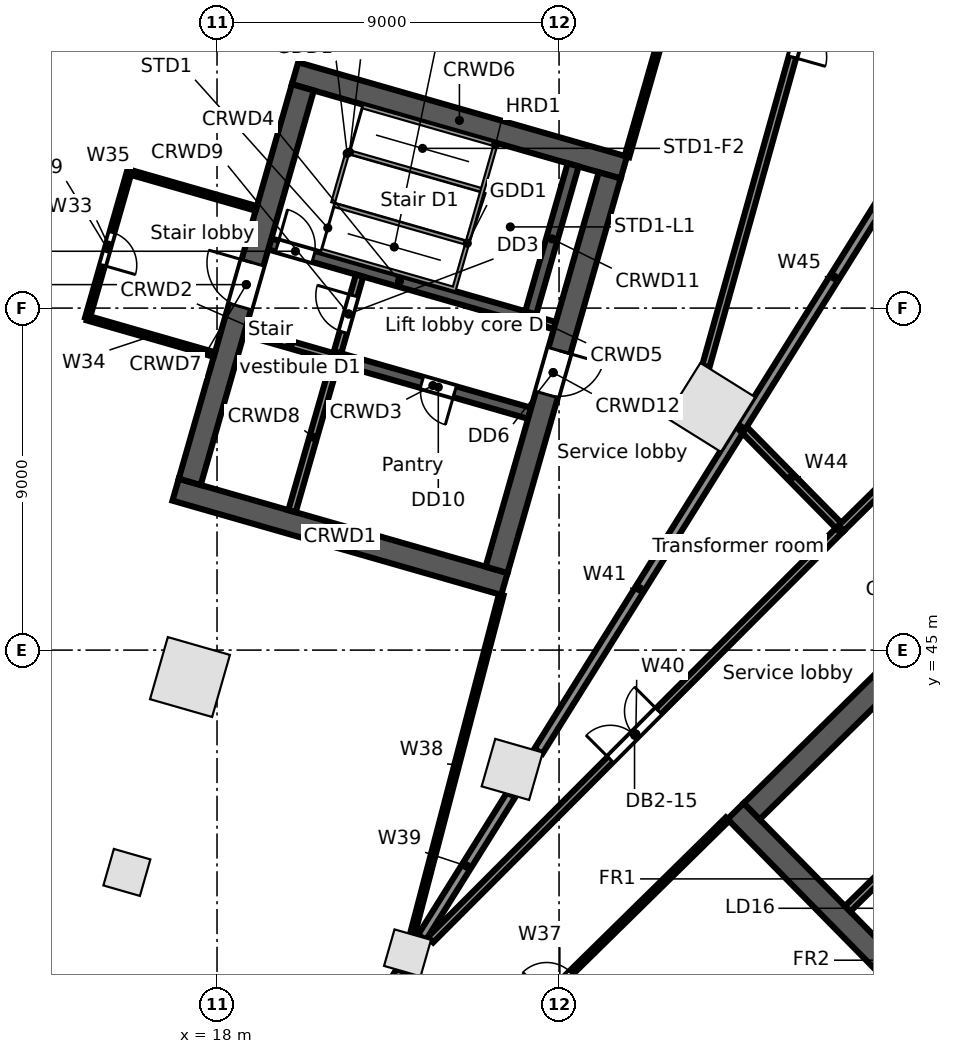
"""IFC4 building model, lengths in metres.
Left out: names, types, materials, properties, quantities, classifications, styles, units other than length and angle.
Written with IfcOpenShell. Run it as: python <this file> out.ifc"""

import sys

from ifc_helpers import new_model, si_unit, direction, frame, frame_2d, origin, origin_2d, place, context, subcontext, project, spatial, rectangle, extrude, element, fill, save


model = new_model("IFC4")
c1 = context("Model", 3, precision=1e-05, world=origin(), true_north=direction((0.0, 1.0)))
c2 = subcontext(c1, "Body", "Model", "MODEL_VIEW")
j1 = project(units=[si_unit("LENGTHUNIT", "METRE"), si_unit("PLANEANGLEUNIT", "RADIAN")], contexts=[c1])
p1 = place(None, origin())
s1 = spatial("IfcSite", under=j1, at=p1, CompositionType="ELEMENT")
p2 = place(p1, origin())
s2 = spatial("IfcBuilding", under=s1, at=p2, CompositionType="ELEMENT")
p3 = place(p2, frame((0.0, 0.0, -9.6)))
s3 = spatial("IfcBuildingStorey", under=s2, at=p3, CompositionType="ELEMENT", Elevation=-9.6)
p4 = place(p3, frame((1.961, 38.491, -0.5), z_axis=(0.0, 0.0, 1.0), x_axis=(0.961261264877, -0.275638859104, 0.0)))
e1 = element("IfcWall", 1, at=p4, inside=s3, PredefinedType="SOLIDWALL", context=c2, shape_type="SweptSolid", body=[
    extrude(rectangle(XDim=20.341, YDim=0.8, at=frame_2d((10.17, 0.0))), origin(), (0.0, 0.0, 1.0), 5.3),
])
p5 = place(p3, frame((17.288, 44.291, -0.5), z_axis=(0.0, 0.0, 1.0), x_axis=(0.961261695938, -0.275637355817, 0.0)))
e2 = element("IfcColumn", 2, at=p5, inside=s3, PredefinedType="COLUMN", context=c2, shape_type="SweptSolid", body=[
    extrude(rectangle(XDim=1.7, YDim=1.7, at=origin_2d()), origin(), (0.0, 0.0, 1.0), 5.3),
])
p6 = place(p3, frame((25.767, 41.86, -0.5), z_axis=(0.0, 0.0, 1.0), x_axis=(0.961261695938, -0.275637355817, 0.0)))
e3 = element("IfcColumn", 3, at=p6, inside=s3, PredefinedType="COLUMN", context=c2, shape_type="SweptSolid", body=[
    extrude(rectangle(XDim=1.3, YDim=1.3, at=origin_2d()), origin(), (0.0, 0.0, 1.0), 5.3),
])
p7 = place(p3, frame((30.99, 51.386, -0.5), z_axis=(0.0, 0.0, 1.0), x_axis=(0.529919264233, 0.848048096156, 0.0)))
e4 = element("IfcColumn", 4, at=p7, inside=s3, PredefinedType="COLUMN", context=c2, shape_type="SweptSolid", body=[
    extrude(rectangle(XDim=1.7, YDim=1.7, at=origin_2d()), origin(), (0.0, 0.0, 1.0), 5.3),
])
for number, where, z_axis, x_axis in (
    (5, (15.628, 39.149, -0.5), (0.0, 0.0, 1.0), (0.961, -0.276, 0.0)),
    (6, (23.013, 37.032, -0.5), (0.0, 0.0, 1.0), (0.961, -0.276, 0.0)),
):
    element("IfcColumn", number, at=place(p3, frame(where, z_axis=z_axis, x_axis=x_axis)), inside=s3, PredefinedType="COLUMN", context=c2, shape_type="SweptSolid", body=[
        extrude(rectangle(XDim=1.0, YDim=1.0, at=origin_2d()), origin(), (0.0, 0.0, 1.0), 5.3),
    ])
p8 = place(p3, frame((31.646, 40.763, 0.0), z_axis=(0.0, 0.0, 1.0), x_axis=(0.700911255944, -0.713248491965, 0.0)))
e7 = element("IfcWall", 7, at=p8, inside=s3, PredefinedType="SOLIDWALL", context=c2, shape_type="SweptSolid", body=[
    extrude(rectangle(XDim=15.0, YDim=0.6, at=frame_2d((7.5, 0.0))), origin(), (0.0, 0.0, 1.0), 4.4),
])
p9 = place(p8, frame((12.9, 0.0, 0.0)))
e8 = element("IfcOpeningElement", 8, at=p9, cuts=e7, PredefinedType="OPENING", context=c2, shape_type="SweptSolid", body=[
    extrude(rectangle(XDim=1.2, YDim=2.1, at=frame_2d((0.6, 1.05))), frame((0.0, 0.31, 0.0), z_axis=(0.0, -1.0, 0.0), x_axis=(1.0, 0.0, 0.0)), (0.0, 0.0, 1.0), 0.62),
])
p10 = place(p3, frame((32.07, 40.759, 0.0), z_axis=(0.0, 0.0, 1.0), x_axis=(0.713245344712, 0.70091445858, 0.0)))
e9 = element("IfcWall", 9, at=p10, inside=s3, PredefinedType="SOLIDWALL", context=c2, shape_type="SweptSolid", body=[
    extrude(rectangle(XDim=13.8, YDim=0.6, at=frame_2d((6.9, 0.0))), origin(), (0.0, 0.0, 1.0), 4.4),
])
p11 = place(p3, frame((34.593, 38.191, 0.0), z_axis=(0.0, 0.0, 1.0), x_axis=(0.713252216116, 0.700907466222, 0.0)))
e10 = element("IfcWall", 10, at=p11, inside=s3, PredefinedType="SOLIDWALL", context=c2, shape_type="SweptSolid", body=[
    extrude(rectangle(XDim=4.45, YDim=0.2, at=frame_2d((2.225, 0.0))), origin(), (0.0, 0.0, 1.0), 4.4),
])
p12 = place(p3, frame((16.911, 49.221, 0.0), z_axis=(0.0, 0.0, 1.0), x_axis=(0.96126248289, -0.275634611374, 0.0)))
e11 = element("IfcWall", 11, at=p12, inside=s3, PredefinedType="SOLIDWALL", context=c2, shape_type="SweptSolid", body=[
    extrude(rectangle(XDim=9.0, YDim=0.6, at=frame_2d((4.5, 0.0))), origin(), (0.0, 0.0, 1.0), 4.4),
])
p13 = place(p3, frame((18.728, 53.382, 0.0), z_axis=(0.0, 0.0, 1.0), x_axis=(0.961247070632, -0.275688355216, 0.0)))
e12 = element("IfcWall", 12, at=p13, inside=s3, PredefinedType="SOLIDWALL", context=c2, shape_type="SweptSolid", body=[
    extrude(rectangle(XDim=2.5, YDim=0.2, at=frame_2d((1.25, 0.0))), origin(), (0.0, 0.0, 1.0), 4.4),
])
p14 = place(p3, frame((21.131, 52.692, 0.0), z_axis=(0.0, 0.0, 1.0), x_axis=(0.961271492568, -0.275603188616, 0.0)))
e13 = element("IfcWall", 13, at=p14, inside=s3, PredefinedType="SOLIDWALL", context=c2, shape_type="SweptSolid", body=[
    extrude(rectangle(XDim=5.3, YDim=0.3, at=frame_2d((2.65, 0.0))), origin(), (0.0, 0.0, 1.0), 4.4),
])
p15 = place(p14, frame((2.35, 0.0, 0.0)))
e14 = element("IfcOpeningElement", 14, at=p15, cuts=e13, PredefinedType="OPENING", context=c2, shape_type="SweptSolid", body=[
    extrude(rectangle(XDim=0.9, YDim=2.1, at=frame_2d((0.45, 1.05))), frame((0.0, 0.16, 0.0), z_axis=(0.0, -1.0, 0.0), x_axis=(1.0, 0.0, 0.0)), (0.0, 0.0, 1.0), 0.32),
])
p16 = place(p3, frame((19.389, 55.689, 0.0), z_axis=(0.0, 0.0, 1.0), x_axis=(0.961261397636, -0.275638396117, 0.0)))
e15 = element("IfcWall", 15, at=p16, inside=s3, PredefinedType="SOLIDWALL", context=c2, shape_type="SweptSolid", body=[
    extrude(rectangle(XDim=7.1, YDim=0.3, at=frame_2d((3.55, 0.0))), origin(), (0.0, 0.0, 1.0), 4.4),
])
p17 = place(p16, frame((0.2, 0.0, 0.0)))
e16 = element("IfcOpeningElement", 16, at=p17, cuts=e15, PredefinedType="OPENING", context=c2, shape_type="SweptSolid", body=[
    extrude(rectangle(XDim=1.0, YDim=2.1, at=frame_2d((0.5, 1.05))), frame((0.0, 0.16, 0.0), z_axis=(0.0, -1.0, 0.0), x_axis=(1.0, 0.0, 0.0)), (0.0, 0.0, 1.0), 0.32),
])
p18 = place(p3, frame((26.214, 53.732, 0.0), z_axis=(0.0, 0.0, 1.0), x_axis=(0.96122076476, -0.27578005982, 0.0)))
e17 = element("IfcWall", 17, at=p18, inside=s3, PredefinedType="SOLIDWALL", context=c2, shape_type="SweptSolid", body=[
    extrude(rectangle(XDim=0.7, YDim=0.2, at=frame_2d((0.35, 0.0))), origin(), (0.0, 0.0, 1.0), 4.4),
])
p19 = place(p3, frame((20.053, 60.18, 0.0), z_axis=(0.0, 0.0, 1.0), x_axis=(0.96126248289, -0.275634611374, 0.0)))
e18 = element("IfcWall", 18, at=p19, inside=s3, PredefinedType="SOLIDWALL", context=c2, shape_type="SweptSolid", body=[
    extrude(rectangle(XDim=9.0, YDim=0.6, at=frame_2d((4.5, 0.0))), origin(), (0.0, 0.0, 1.0), 4.4),
])
p20 = place(p3, frame((17.282, 49.427, 0.0), z_axis=(0.0, 0.0, 1.0), x_axis=(0.275631631629, 0.961263337304, 0.0)))
e19 = element("IfcWall", 19, at=p20, inside=s3, PredefinedType="SOLIDWALL", context=c2, shape_type="SweptSolid", body=[
    extrude(rectangle(XDim=10.8, YDim=0.6, at=frame_2d((5.4, 0.0))), origin(), (0.0, 0.0, 1.0), 4.4),
])
p21 = place(p20, frame((4.8, 0.0, 0.0)))
e20 = element("IfcOpeningElement", 20, at=p21, cuts=e19, PredefinedType="OPENING", context=c2, shape_type="SweptSolid", body=[
    extrude(rectangle(XDim=1.2, YDim=2.1, at=frame_2d((0.6, 1.05))), frame((0.0, 0.31, 0.0), z_axis=(0.0, -1.0, 0.0), x_axis=(1.0, 0.0, 0.0)), (0.0, 0.0, 1.0), 0.62),
])
p22 = place(p3, frame((19.973, 48.655, 0.0), z_axis=(0.0, 0.0, 1.0), x_axis=(0.275668441653, 0.961252781674, 0.0)))
e21 = element("IfcWall", 21, at=p22, inside=s3, PredefinedType="SOLIDWALL", context=c2, shape_type="SweptSolid", body=[
    extrude(rectangle(XDim=4.05, YDim=0.2, at=frame_2d((2.025, 0.0))), origin(), (0.0, 0.0, 1.0), 4.4),
])
p23 = place(p3, frame((21.172, 52.837, 0.0), z_axis=(0.0, 0.0, 1.0), x_axis=(0.275657676022, 0.961255868981, 0.0)))
e22 = element("IfcWall", 22, at=p23, inside=s3, PredefinedType="PARTITIONING", context=c2, shape_type="SweptSolid", body=[
    extrude(rectangle(XDim=2.1, YDim=0.2, at=frame_2d((1.05, 0.0))), origin(), (0.0, 0.0, 1.0), 4.4),
])
p24 = place(p23, frame((0.55, 0.0, 0.0)))
e23 = element("IfcOpeningElement", 23, at=p24, cuts=e22, PredefinedType="OPENING", context=c2, shape_type="SweptSolid", body=[
    extrude(rectangle(XDim=1.0, YDim=2.1, at=frame_2d((0.5, 1.05))), frame((0.0, 0.11, 0.0), z_axis=(0.0, -1.0, 0.0), x_axis=(1.0, 0.0, 0.0)), (0.0, 0.0, 1.0), 0.22),
])
p25 = place(p3, frame((26.256, 53.876, 0.0), z_axis=(0.0, 0.0, 1.0), x_axis=(0.275612739511, 0.961268754209, 0.0)))
e24 = element("IfcWall", 24, at=p25, inside=s3, PredefinedType="SOLIDWALL", context=c2, shape_type="SweptSolid", body=[
    extrude(rectangle(XDim=4.05, YDim=0.3, at=frame_2d((2.025, 0.0))), origin(), (0.0, 0.0, 1.0), 4.4),
])
p26 = place(p3, frame((25.356, 47.112, 0.0), z_axis=(0.0, 0.0, 1.0), x_axis=(0.275631631629, 0.961263337304, 0.0)))
e25 = element("IfcWall", 25, at=p26, inside=s3, PredefinedType="SOLIDWALL", context=c2, shape_type="SweptSolid", body=[
    extrude(rectangle(XDim=10.8, YDim=0.6, at=frame_2d((5.4, 0.0))), origin(), (0.0, 0.0, 1.0), 4.4),
])
p27 = place(p26, frame((4.8, 0.0, 0.0)))
e26 = element("IfcOpeningElement", 26, at=p27, cuts=e25, PredefinedType="OPENING", context=c2, shape_type="SweptSolid", body=[
    extrude(rectangle(XDim=1.2, YDim=2.1, at=frame_2d((0.6, 1.05))), frame((0.0, 0.31, 0.0), z_axis=(0.0, -1.0, 0.0), x_axis=(1.0, 0.0, 0.0)), (0.0, 0.0, 1.0), 0.62),
])
p28 = place(p3, frame((14.589, 53.736, 0.0), z_axis=(0.0, 0.0, 1.0), x_axis=(0.275470792429, 0.961309441605, 0.0)))
e27 = element("IfcWall", 27, at=p28, inside=s3, PredefinedType="PARTITIONING", context=c2, shape_type="SweptSolid", body=[
    extrude(rectangle(XDim=4.0, YDim=0.125, at=frame_2d((2.0, 0.0))), origin(), (0.0, 0.0, 1.0), 3.462),
])
p29 = place(p28, frame((1.45, 0.0, 0.0)))
e28 = element("IfcOpeningElement", 28, at=p29, cuts=e27, PredefinedType="OPENING", context=c2, shape_type="SweptSolid", body=[
    extrude(rectangle(XDim=0.9, YDim=2.1, at=frame_2d((0.45, 1.05))), frame((0.0, 0.073, 0.0), z_axis=(0.0, -1.0, 0.0), x_axis=(1.0, 0.0, 0.0)), (0.0, 0.0, 1.0), 0.145),
])
p30 = place(p3, frame((14.589, 53.736, 0.0), z_axis=(0.0, 0.0, 1.0), x_axis=(0.961258417425, -0.275648789095, 0.0)))
e29 = element("IfcWall", 29, at=p30, inside=s3, PredefinedType="PARTITIONING", context=c2, shape_type="SweptSolid", body=[
    extrude(rectangle(XDim=3.476, YDim=0.125, at=frame_2d((1.738, 0.0))), origin(), (0.0, 0.0, 1.0), 4.4),
])
p31 = place(p3, frame((15.691, 57.581, 0.0), z_axis=(0.0, 0.0, 1.0), x_axis=(0.9612850915, -0.275555752725, 0.0)))
e30 = element("IfcWall", 30, at=p31, inside=s3, PredefinedType="PARTITIONING", context=c2, shape_type="SweptSolid", body=[
    extrude(rectangle(XDim=3.477, YDim=0.125, at=frame_2d((1.738, 0.0))), origin(), (0.0, 0.0, 1.0), 3.462),
])
p32 = place(p3, frame((20.916, 33.472, 0.0), z_axis=(0.0, 0.0, 1.0), x_axis=(0.529775918086, 0.848137651927, 0.0)))
e31 = element("IfcWall", 31, at=p32, inside=s3, PredefinedType="PARTITIONING", context=c2, shape_type="SweptSolid", body=[
    extrude(rectangle(XDim=3.641, YDim=0.25, at=frame_2d((1.821, 0.0))), origin(), (0.0, 0.0, 1.0), 4.4),
])
p33 = place(p3, frame((22.61, 31.884, 0.0), z_axis=(0.0, 0.0, 1.0), x_axis=(0.71329764845, 0.700861230712, 0.0)))
e32 = element("IfcWall", 32, at=p33, inside=s3, PredefinedType="PARTITIONING", context=c2, shape_type="SweptSolid", body=[
    extrude(rectangle(XDim=12.368, YDim=0.125, at=frame_2d((6.184, 0.0))), origin(), (0.0, 0.0, 1.0), 3.68),
])
p34 = place(p33, frame((5.7, 0.0, 0.0)))
e33 = element("IfcOpeningElement", 33, at=p34, cuts=e32, PredefinedType="OPENING", context=c2, shape_type="SweptSolid", body=[
    extrude(rectangle(XDim=0.9, YDim=2.1, at=frame_2d((0.45, 1.05))), frame((0.0, 0.073, 0.0), z_axis=(0.0, -1.0, 0.0), x_axis=(1.0, 0.0, 0.0)), (0.0, 0.0, 1.0), 0.145),
])
p35 = place(p3, frame((23.139, 37.516, 0.0), z_axis=(0.0, 0.0, 1.0), x_axis=(0.253335246865, 0.967378546741, 0.0)))
e34 = element("IfcWall", 34, at=p35, inside=s3, PredefinedType="PARTITIONING", context=c2, shape_type="SweptSolid", body=[
    extrude(rectangle(XDim=9.237, YDim=0.125, at=frame_2d((4.619, 0.0))), origin(), (0.0, 0.0, 1.0), 3.768),
])
p36 = place(p3, frame((23.396, 37.442, 0.0), z_axis=(0.0, 0.0, 1.0), x_axis=(0.529879823435, 0.848072740227, 0.0)))
e35 = element("IfcWall", 35, at=p36, inside=s3, PredefinedType="PARTITIONING", context=c2, shape_type="SweptSolid", body=[
    extrude(rectangle(XDim=4.422, YDim=0.25, at=frame_2d((2.211, 0.0))), origin(), (0.0, 0.0, 1.0), 3.462),
])
p37 = place(p3, frame((23.618, 37.379, 0.0), z_axis=(0.0, 0.0, 1.0), x_axis=(0.706356332605, 0.707856434165, 0.0)))
e36 = element("IfcWall", 36, at=p37, inside=s3, PredefinedType="PARTITIONING", context=c2, shape_type="SweptSolid", body=[
    extrude(rectangle(XDim=15.298, YDim=0.2, at=frame_2d((7.649, 0.0))), origin(), (0.0, 0.0, 1.0), 3.572),
])
p38 = place(p37, frame((6.7, 0.0, 0.0)))
e37 = element("IfcOpeningElement", 37, at=p38, cuts=e36, PredefinedType="OPENING", context=c2, shape_type="SweptSolid", body=[
    extrude(rectangle(XDim=1.8, YDim=2.1, at=frame_2d((0.9, 1.05))), frame((0.0, 0.11, 0.0), z_axis=(0.0, -1.0, 0.0), x_axis=(1.0, 0.0, 0.0)), (0.0, 0.0, 1.0), 0.22),
])
p39 = place(p3, frame((26.456, 42.338, 0.0), z_axis=(0.0, 0.0, 1.0), x_axis=(0.529866075757, 0.848081329686, 0.0)))
e38 = element("IfcWall", 38, at=p39, inside=s3, PredefinedType="PARTITIONING", context=c2, shape_type="SweptSolid", body=[
    extrude(rectangle(XDim=10.076, YDim=0.25, at=frame_2d((5.038, 0.0))), origin(), (0.0, 0.0, 1.0), 3.462),
])
p40 = place(p3, frame((28.787, 57.987, 0.0), z_axis=(0.0, 0.0, 1.0), x_axis=(0.27563893724, 0.961261242471, 0.0)))
e39 = element("IfcWall", 39, at=p40, inside=s3, PredefinedType="PARTITIONING", context=c2, shape_type="SweptSolid", body=[
    extrude(rectangle(XDim=13.735, YDim=0.125, at=frame_2d((6.867, 0.0))), origin(), (0.0, 0.0, 1.0), 3.68),
])
p41 = place(p40, frame((6.45, 0.0, 0.0)))
e40 = element("IfcOpeningElement", 40, at=p41, cuts=e39, PredefinedType="OPENING", context=c2, shape_type="SweptSolid", body=[
    extrude(rectangle(XDim=0.9, YDim=2.1, at=frame_2d((0.45, 1.05))), frame((0.0, 0.073, 0.0), z_axis=(0.0, -1.0, 0.0), x_axis=(1.0, 0.0, 0.0)), (0.0, 0.0, 1.0), 0.145),
])
p42 = place(p3, frame((30.862, 52.468, 0.0), z_axis=(0.0, 0.0, 1.0), x_axis=(0.269850069582, 0.962902352238, 0.0)))
e41 = element("IfcWall", 41, at=p42, inside=s3, PredefinedType="PARTITIONING", context=c2, shape_type="SweptSolid", body=[
    extrude(rectangle(XDim=18.469, YDim=0.2, at=frame_2d((9.234, 0.0))), origin(), (0.0, 0.0, 1.0), 3.68),
])
p43 = place(p42, frame((8.45, 0.0, 0.0)))
e42 = element("IfcOpeningElement", 42, at=p43, cuts=e41, PredefinedType="OPENING", context=c2, shape_type="SweptSolid", body=[
    extrude(rectangle(XDim=1.8, YDim=2.1, at=frame_2d((0.9, 1.05))), frame((0.0, 0.11, 0.0), z_axis=(0.0, -1.0, 0.0), x_axis=(1.0, 0.0, 0.0)), (0.0, 0.0, 1.0), 0.22),
])
p44 = place(p3, frame((31.795, 50.883, 0.0), z_axis=(0.0, 0.0, 1.0), x_axis=(0.700961783082, -0.713198835289, 0.0)))
e43 = element("IfcWall", 43, at=p44, inside=s3, PredefinedType="PARTITIONING", context=c2, shape_type="SweptSolid", body=[
    extrude(rectangle(XDim=3.751, YDim=0.2, at=frame_2d((1.875, 0.0))), origin(), (0.0, 0.0, 1.0), 3.572),
])
p45 = place(p3, frame((31.795, 50.883, 0.0), z_axis=(0.0, 0.0, 1.0), x_axis=(0.529939676421, 0.848035340864, 0.0)))
e44 = element("IfcWall", 44, at=p45, inside=s3, PredefinedType="PARTITIONING", context=c2, shape_type="SweptSolid", body=[
    extrude(rectangle(XDim=9.258, YDim=0.25, at=frame_2d((4.629, 0.0))), origin(), (0.0, 0.0, 1.0), 3.572),
])
p46 = place(p3, frame((33.916, 20.378, 0.0), z_axis=(0.0, 0.0, 1.0), x_axis=(0.857167223985, 0.515038202589, 0.0)))
e45 = element("IfcWall", 45, at=p46, inside=s3, PredefinedType="PARTITIONING", context=c2, shape_type="SweptSolid", body=[
    extrude(rectangle(XDim=39.374, YDim=0.125, at=frame_2d((19.687, 0.0))), origin(), (0.0, 0.0, 1.0), 3.48),
])
p47 = place(p3, frame((34.424, 48.208, 0.0), z_axis=(0.0, 0.0, 1.0), x_axis=(0.711998848244, 0.702180632102, 0.0)))
e46 = element("IfcWall", 46, at=p47, inside=s3, PredefinedType="PARTITIONING", context=c2, shape_type="SweptSolid", body=[
    extrude(rectangle(XDim=19.868, YDim=0.2, at=frame_2d((9.934, 0.0))), origin(), (0.0, 0.0, 1.0), 3.672),
])
p48 = place(p47, frame((8.95, 0.0, 0.0)))
e47 = element("IfcOpeningElement", 47, at=p48, cuts=e46, PredefinedType="OPENING", context=c2, shape_type="SweptSolid", body=[
    extrude(rectangle(XDim=1.8, YDim=2.1, at=frame_2d((0.9, 1.05))), frame((0.0, 0.11, 0.0), z_axis=(0.0, -1.0, 0.0), x_axis=(1.0, 0.0, 0.0)), (0.0, 0.0, 1.0), 0.22),
])
p49 = place(p17, origin())
e48 = element("IfcDoor", 48, at=p49, inside=s3, OperationType="SINGLE_SWING_LEFT", PredefinedType="DOOR", context=c2, shape_type="SweptSolid", body=[
    extrude(rectangle(XDim=1.0, YDim=2.1, at=frame_2d((0.5, 1.05))), frame((0.0, 0.025, 0.0), z_axis=(0.0, -1.0, 0.0), x_axis=(1.0, 0.0, 0.0)), (0.0, 0.0, 1.0), 0.05),
])
fill(e16, e48)
p50 = place(p24, origin())
e49 = element("IfcDoor", 49, at=p50, inside=s3, OperationType="SINGLE_SWING_RIGHT", PredefinedType="DOOR", context=c2, shape_type="SweptSolid", body=[
    extrude(rectangle(XDim=1.0, YDim=2.1, at=frame_2d((0.5, 1.05))), frame((0.0, 0.025, 0.0), z_axis=(0.0, -1.0, 0.0), x_axis=(1.0, 0.0, 0.0)), (0.0, 0.0, 1.0), 0.05),
])
fill(e23, e49)
p51 = place(p21, origin())
e50 = element("IfcDoor", 50, at=p51, inside=s3, OperationType="SINGLE_SWING_RIGHT", PredefinedType="DOOR", context=c2, shape_type="SweptSolid", body=[
    extrude(rectangle(XDim=1.2, YDim=2.1, at=frame_2d((0.6, 1.05))), frame((0.0, 0.025, 0.0), z_axis=(0.0, -1.0, 0.0), x_axis=(1.0, 0.0, 0.0)), (0.0, 0.0, 1.0), 0.05),
])
fill(e20, e50)
p52 = place(p27, frame((1.2, 0.0, 0.0), z_axis=(0.0, 0.0, 1.0), x_axis=(-1.0, 0.0, 0.0)))
e51 = element("IfcDoor", 51, at=p52, inside=s3, OperationType="SINGLE_SWING_LEFT", PredefinedType="DOOR", context=c2, shape_type="SweptSolid", body=[
    extrude(rectangle(XDim=1.2, YDim=2.1, at=frame_2d((0.6, 1.05))), frame((0.0, 0.025, 0.0), z_axis=(0.0, -1.0, 0.0), x_axis=(1.0, 0.0, 0.0)), (0.0, 0.0, 1.0), 0.05),
])
fill(e26, e51)
p53 = place(p15, frame((0.9, 0.0, 0.0), z_axis=(0.0, 0.0, 1.0), x_axis=(-1.0, 0.0, 0.0)))
e52 = element("IfcDoor", 52, at=p53, inside=s3, OperationType="SINGLE_SWING_LEFT", PredefinedType="DOOR", context=c2, shape_type="SweptSolid", body=[
    extrude(rectangle(XDim=0.9, YDim=2.1, at=frame_2d((0.45, 1.05))), frame((0.0, 0.025, 0.0), z_axis=(0.0, -1.0, 0.0), x_axis=(1.0, 0.0, 0.0)), (0.0, 0.0, 1.0), 0.05),
])
fill(e14, e52)
p54 = place(p29, frame((0.9, 0.0, 0.0), z_axis=(0.0, 0.0, 1.0), x_axis=(-1.0, 0.0, 0.0)))
e53 = element("IfcDoor", 53, at=p54, inside=s3, OperationType="SINGLE_SWING_RIGHT", PredefinedType="DOOR", context=c2, shape_type="SweptSolid", body=[
    extrude(rectangle(XDim=0.9, YDim=2.1, at=frame_2d((0.45, 1.05))), frame((0.0, 0.025, 0.0), z_axis=(0.0, -1.0, 0.0), x_axis=(1.0, 0.0, 0.0)), (0.0, 0.0, 1.0), 0.05),
])
fill(e28, e53)
p55 = place(p43, frame((1.8, 0.0, 0.0), z_axis=(0.0, 0.0, 1.0), x_axis=(-1.0, 0.0, 0.0)))
e54 = element("IfcDoor", 54, at=p55, inside=s3, OperationType="DOUBLE_DOOR_SINGLE_SWING", PredefinedType="DOOR", context=c2, shape_type="SweptSolid", body=[
    extrude(rectangle(XDim=1.8, YDim=2.1, at=frame_2d((0.9, 1.05))), frame((0.0, 0.025, 0.0), z_axis=(0.0, -1.0, 0.0), x_axis=(1.0, 0.0, 0.0)), (0.0, 0.0, 1.0), 0.05),
])
fill(e42, e54)
p56 = place(p34, origin())
e55 = element("IfcDoor", 55, at=p56, inside=s3, OperationType="SINGLE_SWING_LEFT", PredefinedType="DOOR", context=c2, shape_type="SweptSolid", body=[
    extrude(rectangle(XDim=0.9, YDim=2.1, at=frame_2d((0.45, 1.05))), frame((0.0, 0.025, 0.0), z_axis=(0.0, -1.0, 0.0), x_axis=(1.0, 0.0, 0.0)), (0.0, 0.0, 1.0), 0.05),
])
fill(e33, e55)
p57 = place(p38, origin())
e56 = element("IfcDoor", 56, at=p57, inside=s3, OperationType="DOUBLE_DOOR_SINGLE_SWING", PredefinedType="DOOR", context=c2, shape_type="SweptSolid", body=[
    extrude(rectangle(XDim=1.8, YDim=2.1, at=frame_2d((0.9, 1.05))), frame((0.0, 0.025, 0.0), z_axis=(0.0, -1.0, 0.0), x_axis=(1.0, 0.0, 0.0)), (0.0, 0.0, 1.0), 0.05),
])
fill(e37, e56)
save(model, sys.argv[1])
